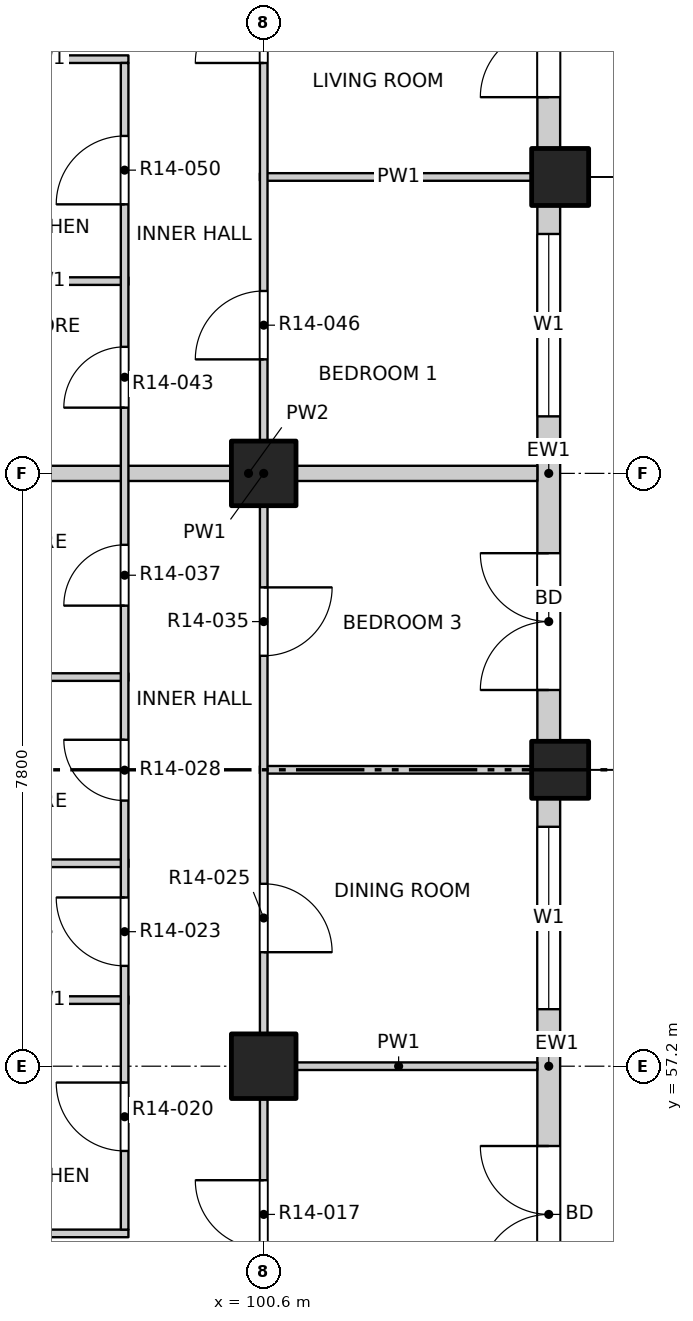
"""IFC4 building model, lengths in metres.
Left out: names, types, materials, properties, quantities, classifications, styles, units other than length and angle.
Written with IfcOpenShell. Run it as: python <this file> out.ifc"""

import sys

from ifc_helpers import new_model, si_unit, direction, frame, frame_2d, origin, origin_2d, place, context, subcontext, project, spatial, rectangle, extrude, element, fill, save


model = new_model("IFC4")
c1 = context("Model", 3, precision=1e-05, world=origin(), true_north=direction((0.0, 1.0)))
c2 = subcontext(c1, "Body", "Model", "MODEL_VIEW")
j1 = project(units=[si_unit("LENGTHUNIT", "METRE"), si_unit("PLANEANGLEUNIT", "RADIAN")], contexts=[c1])
p1 = place(None, origin())
s1 = spatial("IfcSite", under=j1, at=p1, CompositionType="ELEMENT")
p2 = place(p1, origin())
s2 = spatial("IfcBuilding", under=s1, at=p2, CompositionType="ELEMENT")
p3 = place(p2, frame((0.0, 0.0, 148.6)))
s3 = spatial("IfcBuildingStorey", under=s2, at=p3, CompositionType="ELEMENT", Elevation=148.6)
for number, where, z_axis, x_axis in (
    (1, (104.5, 61.1, -0.3), (0.0, 0.0, 1.0), (1.0, 0.0, 0.0)),
    (2, (104.5, 68.9, -0.3), (0.0, 0.0, 1.0), (1.0, 0.0, 0.0)),
):
    element("IfcColumn", number, at=place(p3, frame(where, z_axis=z_axis, x_axis=x_axis)), inside=s3, PredefinedType="COLUMN", context=c2, shape_type="SweptSolid", body=[
        extrude(rectangle(XDim=0.75, YDim=0.75, at=origin_2d()), origin(), (0.0, 0.0, 1.0), 3.45),
    ])
for number, where, z_axis, x_axis in (
    (3, (100.6, 57.2, -0.3), (0.0, 0.0, 1.0), (1.0, 0.0, 0.0)),
    (4, (100.6, 65.0, -0.3), (0.0, 0.0, 1.0), (1.0, 0.0, 0.0)),
):
    element("IfcColumn", number, at=place(p3, frame(where, z_axis=z_axis, x_axis=x_axis)), inside=s3, PredefinedType="COLUMN", context=c2, shape_type="SweptSolid", body=[
        extrude(rectangle(XDim=0.85, YDim=0.85, at=origin_2d()), origin(), (0.0, 0.0, 1.0), 3.45),
    ])
p4 = place(p3, frame((104.35, 53.675, 0.0), z_axis=(0.0, 0.0, 1.0), x_axis=(0.0, 1.0, 0.0)))
e5 = element("IfcWall", 5, at=p4, inside=s3, PredefinedType="SOLIDWALL", context=c2, shape_type="SweptSolid", body=[
    extrude(rectangle(XDim=7.05, YDim=0.3, at=frame_2d((3.525, 0.0))), origin(), (0.0, 0.0, 1.0), 2.7),
])
p5 = place(p4, frame((0.675, 0.0, 0.0)))
e6 = element("IfcOpeningElement", 6, at=p5, cuts=e5, PredefinedType="OPENING", context=c2, shape_type="SweptSolid", body=[
    extrude(rectangle(XDim=1.8, YDim=2.4, at=frame_2d((0.9, 1.2))), frame((0.0, 0.16, 0.0), z_axis=(0.0, -1.0, 0.0), x_axis=(1.0, 0.0, 0.0)), (0.0, 0.0, 1.0), 0.32),
])
p6 = place(p4, frame((4.275, 0.0, 0.9)))
e7 = element("IfcOpeningElement", 7, at=p6, cuts=e5, PredefinedType="OPENING", context=c2, shape_type="SweptSolid", body=[
    extrude(rectangle(XDim=2.4, YDim=1.8, at=frame_2d((1.2, 0.9))), frame((0.0, 0.16, 0.0), z_axis=(0.0, -1.0, 0.0), x_axis=(1.0, 0.0, 0.0)), (0.0, 0.0, 1.0), 0.32),
])
p7 = place(p3, frame((104.35, 61.475, 0.0), z_axis=(0.0, 0.0, 1.0), x_axis=(0.0, 1.0, 0.0)))
e8 = element("IfcWall", 8, at=p7, inside=s3, PredefinedType="SOLIDWALL", context=c2, shape_type="SweptSolid", body=[
    extrude(rectangle(XDim=7.05, YDim=0.3, at=frame_2d((3.525, 0.0))), origin(), (0.0, 0.0, 1.0), 2.7),
])
p8 = place(p7, frame((0.675, 0.0, 0.0)))
e9 = element("IfcOpeningElement", 9, at=p8, cuts=e8, PredefinedType="OPENING", context=c2, shape_type="SweptSolid", body=[
    extrude(rectangle(XDim=1.8, YDim=2.4, at=frame_2d((0.9, 1.2))), frame((0.0, 0.16, 0.0), z_axis=(0.0, -1.0, 0.0), x_axis=(1.0, 0.0, 0.0)), (0.0, 0.0, 1.0), 0.32),
])
p9 = place(p7, frame((4.275, 0.0, 0.9)))
e10 = element("IfcOpeningElement", 10, at=p9, cuts=e8, PredefinedType="OPENING", context=c2, shape_type="SweptSolid", body=[
    extrude(rectangle(XDim=2.4, YDim=1.8, at=frame_2d((1.2, 0.9))), frame((0.0, 0.16, 0.0), z_axis=(0.0, -1.0, 0.0), x_axis=(1.0, 0.0, 0.0)), (0.0, 0.0, 1.0), 0.32),
])
p10 = place(p3, frame((104.35, 69.275, 0.0), z_axis=(0.0, 0.0, 1.0), x_axis=(0.0, 1.0, 0.0)))
e11 = element("IfcWall", 11, at=p10, inside=s3, PredefinedType="SOLIDWALL", context=c2, shape_type="SweptSolid", body=[
    extrude(rectangle(XDim=7.05, YDim=0.3, at=frame_2d((3.525, 0.0))), origin(), (0.0, 0.0, 1.0), 2.7),
])
p11 = place(p10, frame((0.675, 0.0, 0.0)))
e12 = element("IfcOpeningElement", 12, at=p11, cuts=e11, PredefinedType="OPENING", context=c2, shape_type="SweptSolid", body=[
    extrude(rectangle(XDim=1.8, YDim=2.4, at=frame_2d((0.9, 1.2))), frame((0.0, 0.16, 0.0), z_axis=(0.0, -1.0, 0.0), x_axis=(1.0, 0.0, 0.0)), (0.0, 0.0, 1.0), 0.32),
])
p12 = place(p10, frame((4.275, 0.0, 0.9)))
e13 = element("IfcOpeningElement", 13, at=p12, cuts=e11, PredefinedType="OPENING", context=c2, shape_type="SweptSolid", body=[
    extrude(rectangle(XDim=2.4, YDim=1.8, at=frame_2d((1.2, 0.9))), frame((0.0, 0.16, 0.0), z_axis=(0.0, -1.0, 0.0), x_axis=(1.0, 0.0, 0.0)), (0.0, 0.0, 1.0), 0.32),
])
p13 = place(p3, frame((96.6, 55.0, 0.0), z_axis=(0.0, 0.0, 1.0), x_axis=(1.0, 0.0, 0.0)))
e14 = element("IfcWall", 14, at=p13, inside=s3, PredefinedType="PARTITIONING", context=c2, shape_type="SweptSolid", body=[
    extrude(rectangle(XDim=2.22, YDim=0.1, at=frame_2d((1.11, 0.0))), origin(), (0.0, 0.0, 1.0), 3.15),
])
p14 = place(p3, frame((100.55, 57.2, 0.0), z_axis=(0.0, 0.0, 1.0), x_axis=(1.0, 0.0, 0.0)))
e15 = element("IfcWall", 15, at=p14, inside=s3, PredefinedType="PARTITIONING", context=c2, shape_type="SweptSolid", body=[
    extrude(rectangle(XDim=3.65, YDim=0.1, at=frame_2d((1.825, 0.0))), origin(), (0.0, 0.0, 1.0), 3.15),
])
for number, where, z_axis, x_axis in (
    (16, (96.6, 58.07, 0.0), (0.0, 0.0, 1.0), (1.0, 0.0, 0.0)),
    (17, (96.6, 59.87, 0.0), (0.0, 0.0, 1.0), (1.0, 0.0, 0.0)),
):
    element("IfcWall", number, at=place(p3, frame(where, z_axis=z_axis, x_axis=x_axis)), inside=s3, PredefinedType="PARTITIONING", context=c2, shape_type="SweptSolid", body=[
        extrude(rectangle(XDim=2.22, YDim=0.1, at=frame_2d((1.11, 0.0))), origin(), (0.0, 0.0, 1.0), 3.15),
    ])
p15 = place(p3, frame((100.55, 61.1, 0.0), z_axis=(0.0, 0.0, 1.0), x_axis=(1.0, 0.0, 0.0)))
e18 = element("IfcWall", 18, at=p15, inside=s3, PredefinedType="PARTITIONING", context=c2, shape_type="SweptSolid", body=[
    extrude(rectangle(XDim=3.65, YDim=0.1, at=frame_2d((1.825, 0.0))), origin(), (0.0, 0.0, 1.0), 2.55),
])
p16 = place(p3, frame((96.6, 62.32, 0.0), z_axis=(0.0, 0.0, 1.0), x_axis=(1.0, 0.0, 0.0)))
e19 = element("IfcWall", 19, at=p16, inside=s3, PredefinedType="PARTITIONING", context=c2, shape_type="SweptSolid", body=[
    extrude(rectangle(XDim=2.22, YDim=0.1, at=frame_2d((1.11, 0.0))), origin(), (0.0, 0.0, 1.0), 3.15),
])
p17 = place(p3, frame((96.6, 65.0, 0.0), z_axis=(0.0, 0.0, 1.0), x_axis=(1.0, 0.0, 0.0)))
e20 = element("IfcWall", 20, at=p17, inside=s3, PredefinedType="PARTITIONING", context=c2, shape_type="SweptSolid", body=[
    extrude(rectangle(XDim=7.6, YDim=0.2, at=frame_2d((3.8, 0.0))), origin(), (0.0, 0.0, 1.0), 3.15),
])
p18 = place(p3, frame((96.6, 67.53, 0.0), z_axis=(0.0, 0.0, 1.0), x_axis=(1.0, 0.0, 0.0)))
e21 = element("IfcWall", 21, at=p18, inside=s3, PredefinedType="PARTITIONING", context=c2, shape_type="SweptSolid", body=[
    extrude(rectangle(XDim=2.22, YDim=0.1, at=frame_2d((1.11, 0.0))), origin(), (0.0, 0.0, 1.0), 3.15),
])
p19 = place(p3, frame((100.55, 68.9, 0.0), z_axis=(0.0, 0.0, 1.0), x_axis=(1.0, 0.0, 0.0)))
e22 = element("IfcWall", 22, at=p19, inside=s3, PredefinedType="PARTITIONING", context=c2, shape_type="SweptSolid", body=[
    extrude(rectangle(XDim=3.65, YDim=0.1, at=frame_2d((1.825, 0.0))), origin(), (0.0, 0.0, 1.0), 2.55),
])
p20 = place(p3, frame((96.6, 70.45, 0.0), z_axis=(0.0, 0.0, 1.0), x_axis=(1.0, 0.0, 0.0)))
e23 = element("IfcWall", 23, at=p20, inside=s3, PredefinedType="PARTITIONING", context=c2, shape_type="SweptSolid", body=[
    extrude(rectangle(XDim=2.22, YDim=0.1, at=frame_2d((1.11, 0.0))), origin(), (0.0, 0.0, 1.0), 3.15),
])
p21 = place(p3, frame((98.77, 55.05, 0.0), z_axis=(0.0, 0.0, 1.0), x_axis=(0.0, 1.0, 0.0)))
e24 = element("IfcWall", 24, at=p21, inside=s3, PredefinedType="PARTITIONING", context=c2, shape_type="SweptSolid", body=[
    extrude(rectangle(XDim=15.35, YDim=0.1, at=frame_2d((7.675, 0.0))), origin(), (0.0, 0.0, 1.0), 3.15),
])
p22 = place(p21, frame((1.035, 0.0, 0.0)))
e25 = element("IfcOpeningElement", 25, at=p22, cuts=e24, PredefinedType="OPENING", context=c2, shape_type="SweptSolid", body=[
    extrude(rectangle(XDim=0.9, YDim=2.1, at=frame_2d((0.45, 1.05))), frame((0.0, 0.06, 0.0), z_axis=(0.0, -1.0, 0.0), x_axis=(1.0, 0.0, 0.0)), (0.0, 0.0, 1.0), 0.12),
])
p23 = place(p21, frame((3.47, 0.0, 0.0)))
e26 = element("IfcOpeningElement", 26, at=p23, cuts=e24, PredefinedType="OPENING", context=c2, shape_type="SweptSolid", body=[
    extrude(rectangle(XDim=0.9, YDim=2.1, at=frame_2d((0.45, 1.05))), frame((0.0, 0.06, 0.0), z_axis=(0.0, -1.0, 0.0), x_axis=(1.0, 0.0, 0.0)), (0.0, 0.0, 1.0), 0.12),
])
p24 = place(p21, frame((5.645, 0.0, 0.0)))
e27 = element("IfcOpeningElement", 27, at=p24, cuts=e24, PredefinedType="OPENING", context=c2, shape_type="SweptSolid", body=[
    extrude(rectangle(XDim=0.8, YDim=2.1, at=frame_2d((0.4, 1.05))), frame((0.0, 0.06, 0.0), z_axis=(0.0, -1.0, 0.0), x_axis=(1.0, 0.0, 0.0)), (0.0, 0.0, 1.0), 0.12),
])
p25 = place(p21, frame((8.21, 0.0, 0.0)))
e28 = element("IfcOpeningElement", 28, at=p25, cuts=e24, PredefinedType="OPENING", context=c2, shape_type="SweptSolid", body=[
    extrude(rectangle(XDim=0.8, YDim=2.1, at=frame_2d((0.4, 1.05))), frame((0.0, 0.06, 0.0), z_axis=(0.0, -1.0, 0.0), x_axis=(1.0, 0.0, 0.0)), (0.0, 0.0, 1.0), 0.12),
])
p26 = place(p21, frame((10.815, 0.0, 0.0)))
e29 = element("IfcOpeningElement", 29, at=p26, cuts=e24, PredefinedType="OPENING", context=c2, shape_type="SweptSolid", body=[
    extrude(rectangle(XDim=0.8, YDim=2.1, at=frame_2d((0.4, 1.05))), frame((0.0, 0.06, 0.0), z_axis=(0.0, -1.0, 0.0), x_axis=(1.0, 0.0, 0.0)), (0.0, 0.0, 1.0), 0.12),
])
p27 = place(p21, frame((13.49, 0.0, 0.0)))
e30 = element("IfcOpeningElement", 30, at=p27, cuts=e24, PredefinedType="OPENING", context=c2, shape_type="SweptSolid", body=[
    extrude(rectangle(XDim=0.9, YDim=2.1, at=frame_2d((0.45, 1.05))), frame((0.0, 0.06, 0.0), z_axis=(0.0, -1.0, 0.0), x_axis=(1.0, 0.0, 0.0)), (0.0, 0.0, 1.0), 0.12),
])
p28 = place(p3, frame((100.6, 45.8, 0.0), z_axis=(0.0, 0.0, 1.0), x_axis=(0.0, 1.0, 0.0)))
e31 = element("IfcWall", 31, at=p28, inside=s3, PredefinedType="PARTITIONING", context=c2, shape_type="SweptSolid", body=[
    extrude(rectangle(XDim=38.4, YDim=0.1, at=frame_2d((19.2, 0.0))), origin(), (0.0, 0.0, 1.0), 3.15),
])
p29 = place(p28, frame((1.05, 0.0, 0.0)))
e32 = element("IfcOpeningElement", 32, at=p29, cuts=e31, PredefinedType="OPENING", context=c2, shape_type="SweptSolid", body=[
    extrude(rectangle(XDim=1.2, YDim=2.1, at=frame_2d((0.6, 1.05))), frame((0.0, 0.06, 0.0), z_axis=(0.0, -1.0, 0.0), x_axis=(1.0, 0.0, 0.0)), (0.0, 0.0, 1.0), 0.12),
])
p30 = place(p28, frame((5.1, 0.0, 0.0)))
e33 = element("IfcOpeningElement", 33, at=p30, cuts=e31, PredefinedType="OPENING", context=c2, shape_type="SweptSolid", body=[
    extrude(rectangle(XDim=0.9, YDim=2.1, at=frame_2d((0.45, 1.05))), frame((0.0, 0.06, 0.0), z_axis=(0.0, -1.0, 0.0), x_axis=(1.0, 0.0, 0.0)), (0.0, 0.0, 1.0), 0.12),
])
p31 = place(p28, frame((9.0, 0.0, 0.0)))
e34 = element("IfcOpeningElement", 34, at=p31, cuts=e31, PredefinedType="OPENING", context=c2, shape_type="SweptSolid", body=[
    extrude(rectangle(XDim=0.9, YDim=2.1, at=frame_2d((0.45, 1.05))), frame((0.0, 0.06, 0.0), z_axis=(0.0, -1.0, 0.0), x_axis=(1.0, 0.0, 0.0)), (0.0, 0.0, 1.0), 0.12),
])
p32 = place(p28, frame((12.9, 0.0, 0.0)))
e35 = element("IfcOpeningElement", 35, at=p32, cuts=e31, PredefinedType="OPENING", context=c2, shape_type="SweptSolid", body=[
    extrude(rectangle(XDim=0.9, YDim=2.1, at=frame_2d((0.45, 1.05))), frame((0.0, 0.06, 0.0), z_axis=(0.0, -1.0, 0.0), x_axis=(1.0, 0.0, 0.0)), (0.0, 0.0, 1.0), 0.12),
])
p33 = place(p28, frame((16.8, 0.0, 0.0)))
e36 = element("IfcOpeningElement", 36, at=p33, cuts=e31, PredefinedType="OPENING", context=c2, shape_type="SweptSolid", body=[
    extrude(rectangle(XDim=0.9, YDim=2.1, at=frame_2d((0.45, 1.05))), frame((0.0, 0.06, 0.0), z_axis=(0.0, -1.0, 0.0), x_axis=(1.0, 0.0, 0.0)), (0.0, 0.0, 1.0), 0.12),
])
p34 = place(p28, frame((20.7, 0.0, 0.0)))
e37 = element("IfcOpeningElement", 37, at=p34, cuts=e31, PredefinedType="OPENING", context=c2, shape_type="SweptSolid", body=[
    extrude(rectangle(XDim=0.9, YDim=2.1, at=frame_2d((0.45, 1.05))), frame((0.0, 0.06, 0.0), z_axis=(0.0, -1.0, 0.0), x_axis=(1.0, 0.0, 0.0)), (0.0, 0.0, 1.0), 0.12),
])
p35 = place(p28, frame((24.6, 0.0, 0.0)))
e38 = element("IfcOpeningElement", 38, at=p35, cuts=e31, PredefinedType="OPENING", context=c2, shape_type="SweptSolid", body=[
    extrude(rectangle(XDim=0.9, YDim=2.1, at=frame_2d((0.45, 1.05))), frame((0.0, 0.06, 0.0), z_axis=(0.0, -1.0, 0.0), x_axis=(1.0, 0.0, 0.0)), (0.0, 0.0, 1.0), 0.12),
])
p36 = place(p28, frame((28.5, 0.0, 0.0)))
e39 = element("IfcOpeningElement", 39, at=p36, cuts=e31, PredefinedType="OPENING", context=c2, shape_type="SweptSolid", body=[
    extrude(rectangle(XDim=0.9, YDim=2.1, at=frame_2d((0.45, 1.05))), frame((0.0, 0.06, 0.0), z_axis=(0.0, -1.0, 0.0), x_axis=(1.0, 0.0, 0.0)), (0.0, 0.0, 1.0), 0.12),
])
p37 = place(p28, frame((32.4, 0.0, 0.0)))
e40 = element("IfcOpeningElement", 40, at=p37, cuts=e31, PredefinedType="OPENING", context=c2, shape_type="SweptSolid", body=[
    extrude(rectangle(XDim=0.9, YDim=2.1, at=frame_2d((0.45, 1.05))), frame((0.0, 0.06, 0.0), z_axis=(0.0, -1.0, 0.0), x_axis=(1.0, 0.0, 0.0)), (0.0, 0.0, 1.0), 0.12),
])
p38 = place(p28, frame((36.15, 0.0, 0.0)))
e41 = element("IfcOpeningElement", 41, at=p38, cuts=e31, PredefinedType="OPENING", context=c2, shape_type="SweptSolid", body=[
    extrude(rectangle(XDim=1.2, YDim=2.1, at=frame_2d((0.6, 1.05))), frame((0.0, 0.06, 0.0), z_axis=(0.0, -1.0, 0.0), x_axis=(1.0, 0.0, 0.0)), (0.0, 0.0, 1.0), 0.12),
])
p39 = place(p5, origin())
e42 = element("IfcDoor", 42, at=p39, inside=s3, OperationType="DOUBLE_DOOR_SINGLE_SWING", PredefinedType="DOOR", context=c2, shape_type="SweptSolid", body=[
    extrude(rectangle(XDim=1.8, YDim=2.4, at=frame_2d((0.9, 1.2))), frame((0.0, 0.025, 0.0), z_axis=(0.0, -1.0, 0.0), x_axis=(1.0, 0.0, 0.0)), (0.0, 0.0, 1.0), 0.05),
])
fill(e6, e42)
p40 = place(p6, origin())
e43 = element("IfcWindow", 43, at=p40, inside=s3, PartitioningType="DOUBLE_PANEL_VERTICAL", PredefinedType="WINDOW", context=c2, shape_type="SweptSolid", body=[
    extrude(rectangle(XDim=2.4, YDim=1.8, at=frame_2d((1.2, 0.9))), frame((0.0, 0.03, 0.0), z_axis=(0.0, -1.0, 0.0), x_axis=(1.0, 0.0, 0.0)), (0.0, 0.0, 1.0), 0.06),
])
fill(e7, e43)
p41 = place(p8, origin())
e44 = element("IfcDoor", 44, at=p41, inside=s3, OperationType="DOUBLE_DOOR_SINGLE_SWING", PredefinedType="DOOR", context=c2, shape_type="SweptSolid", body=[
    extrude(rectangle(XDim=1.8, YDim=2.4, at=frame_2d((0.9, 1.2))), frame((0.0, 0.025, 0.0), z_axis=(0.0, -1.0, 0.0), x_axis=(1.0, 0.0, 0.0)), (0.0, 0.0, 1.0), 0.05),
])
fill(e9, e44)
p42 = place(p9, origin())
e45 = element("IfcWindow", 45, at=p42, inside=s3, PartitioningType="DOUBLE_PANEL_VERTICAL", PredefinedType="WINDOW", context=c2, shape_type="SweptSolid", body=[
    extrude(rectangle(XDim=2.4, YDim=1.8, at=frame_2d((1.2, 0.9))), frame((0.0, 0.03, 0.0), z_axis=(0.0, -1.0, 0.0), x_axis=(1.0, 0.0, 0.0)), (0.0, 0.0, 1.0), 0.06),
])
fill(e10, e45)
p43 = place(p11, origin())
e46 = element("IfcDoor", 46, at=p43, inside=s3, OperationType="DOUBLE_DOOR_SINGLE_SWING", PredefinedType="DOOR", context=c2, shape_type="SweptSolid", body=[
    extrude(rectangle(XDim=1.8, YDim=2.4, at=frame_2d((0.9, 1.2))), frame((0.0, 0.025, 0.0), z_axis=(0.0, -1.0, 0.0), x_axis=(1.0, 0.0, 0.0)), (0.0, 0.0, 1.0), 0.05),
])
fill(e12, e46)
p44 = place(p31, origin())
e47 = element("IfcDoor", 47, at=p44, inside=s3, OperationType="SINGLE_SWING_RIGHT", PredefinedType="DOOR", context=c2, shape_type="SweptSolid", body=[
    extrude(rectangle(XDim=0.9, YDim=2.1, at=frame_2d((0.45, 1.05))), frame((0.0, 0.025, 0.0), z_axis=(0.0, -1.0, 0.0), x_axis=(1.0, 0.0, 0.0)), (0.0, 0.0, 1.0), 0.05),
])
fill(e34, e47)
p45 = place(p22, origin())
e48 = element("IfcDoor", 48, at=p45, inside=s3, OperationType="SINGLE_SWING_RIGHT", PredefinedType="DOOR", context=c2, shape_type="SweptSolid", body=[
    extrude(rectangle(XDim=0.9, YDim=2.1, at=frame_2d((0.45, 1.05))), frame((0.0, 0.025, 0.0), z_axis=(0.0, -1.0, 0.0), x_axis=(1.0, 0.0, 0.0)), (0.0, 0.0, 1.0), 0.05),
])
fill(e25, e48)
p46 = place(p23, origin())
e49 = element("IfcDoor", 49, at=p46, inside=s3, OperationType="SINGLE_SWING_RIGHT", PredefinedType="DOOR", context=c2, shape_type="SweptSolid", body=[
    extrude(rectangle(XDim=0.9, YDim=2.1, at=frame_2d((0.45, 1.05))), frame((0.0, 0.025, 0.0), z_axis=(0.0, -1.0, 0.0), x_axis=(1.0, 0.0, 0.0)), (0.0, 0.0, 1.0), 0.05),
])
fill(e26, e49)
p47 = place(p32, origin())
e50 = element("IfcDoor", 50, at=p47, inside=s3, OperationType="SINGLE_SWING_RIGHT", PredefinedType="DOOR", context=c2, shape_type="SweptSolid", body=[
    extrude(rectangle(XDim=0.9, YDim=2.1, at=frame_2d((0.45, 1.05))), frame((0.0, 0.025, 0.0), z_axis=(0.0, -1.0, 0.0), x_axis=(1.0, 0.0, 0.0)), (0.0, 0.0, 1.0), 0.05),
])
fill(e35, e50)
p48 = place(p24, origin())
e51 = element("IfcDoor", 51, at=p48, inside=s3, OperationType="SINGLE_SWING_RIGHT", PredefinedType="DOOR", context=c2, shape_type="SweptSolid", body=[
    extrude(rectangle(XDim=0.8, YDim=2.1, at=frame_2d((0.4, 1.05))), frame((0.0, 0.025, 0.0), z_axis=(0.0, -1.0, 0.0), x_axis=(1.0, 0.0, 0.0)), (0.0, 0.0, 1.0), 0.05),
])
fill(e27, e51)
p49 = place(p33, origin())
e52 = element("IfcDoor", 52, at=p49, inside=s3, OperationType="SINGLE_SWING_LEFT", PredefinedType="DOOR", context=c2, shape_type="SweptSolid", body=[
    extrude(rectangle(XDim=0.9, YDim=2.1, at=frame_2d((0.45, 1.05))), frame((0.0, 0.025, 0.0), z_axis=(0.0, -1.0, 0.0), x_axis=(1.0, 0.0, 0.0)), (0.0, 0.0, 1.0), 0.05),
])
fill(e36, e52)
p50 = place(p25, origin())
e53 = element("IfcDoor", 53, at=p50, inside=s3, OperationType="SINGLE_SWING_LEFT", PredefinedType="DOOR", context=c2, shape_type="SweptSolid", body=[
    extrude(rectangle(XDim=0.8, YDim=2.1, at=frame_2d((0.4, 1.05))), frame((0.0, 0.025, 0.0), z_axis=(0.0, -1.0, 0.0), x_axis=(1.0, 0.0, 0.0)), (0.0, 0.0, 1.0), 0.05),
])
fill(e28, e53)
p51 = place(p26, origin())
e54 = element("IfcDoor", 54, at=p51, inside=s3, OperationType="SINGLE_SWING_LEFT", PredefinedType="DOOR", context=c2, shape_type="SweptSolid", body=[
    extrude(rectangle(XDim=0.8, YDim=2.1, at=frame_2d((0.4, 1.05))), frame((0.0, 0.025, 0.0), z_axis=(0.0, -1.0, 0.0), x_axis=(1.0, 0.0, 0.0)), (0.0, 0.0, 1.0), 0.05),
])
fill(e29, e54)
p52 = place(p34, origin())
e55 = element("IfcDoor", 55, at=p52, inside=s3, OperationType="SINGLE_SWING_LEFT", PredefinedType="DOOR", context=c2, shape_type="SweptSolid", body=[
    extrude(rectangle(XDim=0.9, YDim=2.1, at=frame_2d((0.45, 1.05))), frame((0.0, 0.025, 0.0), z_axis=(0.0, -1.0, 0.0), x_axis=(1.0, 0.0, 0.0)), (0.0, 0.0, 1.0), 0.05),
])
fill(e37, e55)
p53 = place(p27, origin())
e56 = element("IfcDoor", 56, at=p53, inside=s3, OperationType="SINGLE_SWING_LEFT", PredefinedType="DOOR", context=c2, shape_type="SweptSolid", body=[
    extrude(rectangle(XDim=0.9, YDim=2.1, at=frame_2d((0.45, 1.05))), frame((0.0, 0.025, 0.0), z_axis=(0.0, -1.0, 0.0), x_axis=(1.0, 0.0, 0.0)), (0.0, 0.0, 1.0), 0.05),
])
fill(e30, e56)
p54 = place(p35, origin())
e57 = element("IfcDoor", 57, at=p54, inside=s3, OperationType="SINGLE_SWING_LEFT", PredefinedType="DOOR", context=c2, shape_type="SweptSolid", body=[
    extrude(rectangle(XDim=0.9, YDim=2.1, at=frame_2d((0.45, 1.05))), frame((0.0, 0.025, 0.0), z_axis=(0.0, -1.0, 0.0), x_axis=(1.0, 0.0, 0.0)), (0.0, 0.0, 1.0), 0.05),
])
fill(e38, e57)
save(model, sys.argv[1])
